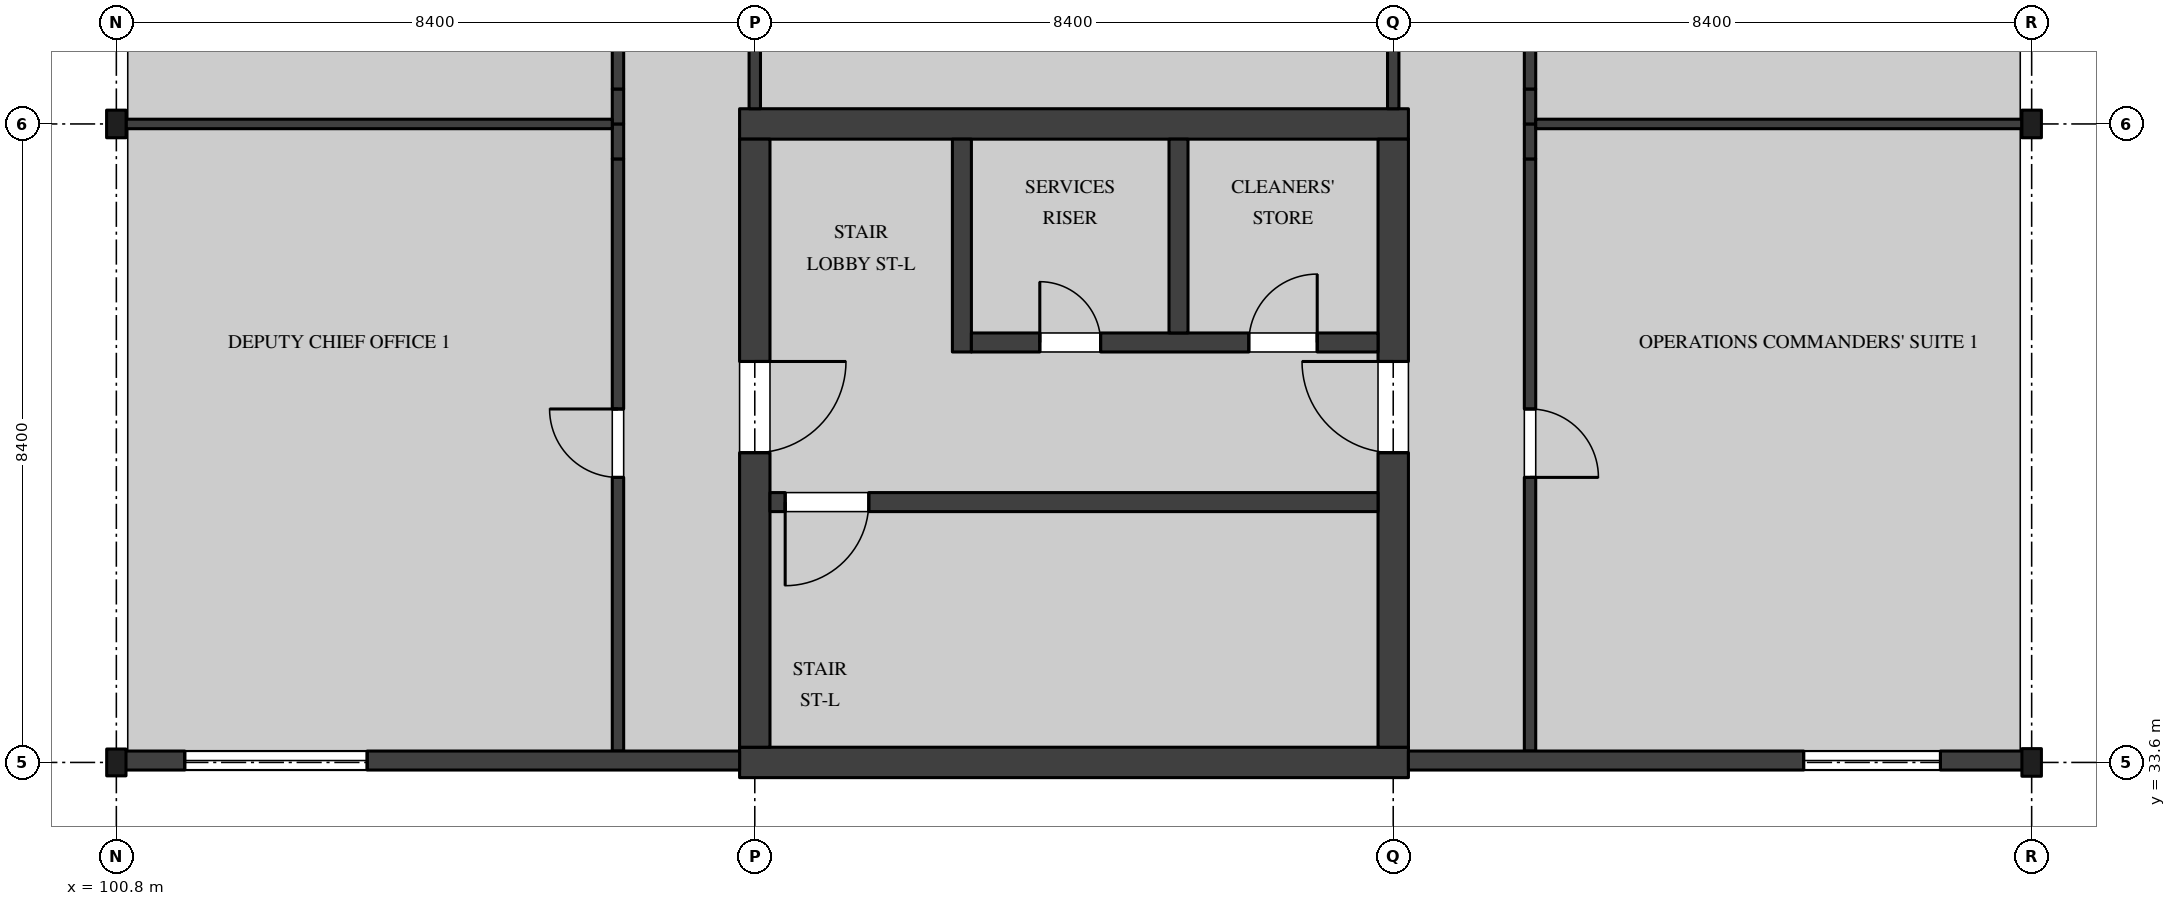
"""IFC4 building model, lengths in metres.
Left out: names, types, materials, properties, quantities, classifications, styles, units other than length and angle.
Written with IfcOpenShell. Run it as: python <this file> out.ifc"""

import sys

from ifc_helpers import new_model, si_unit, direction, frame, frame_2d, origin, origin_2d, place, context, subcontext, project, spatial, rectangle, i_section, extrude, element, fill, save


model = new_model("IFC4")
c1 = context("Model", 3, precision=1e-05, world=origin(), true_north=direction((0.0, 1.0)))
c2 = subcontext(c1, "Body", "Model", "MODEL_VIEW")
j1 = project(units=[si_unit("LENGTHUNIT", "METRE"), si_unit("PLANEANGLEUNIT", "RADIAN")], contexts=[c1])
p1 = place(None, origin())
s1 = spatial("IfcSite", under=j1, at=p1, CompositionType="ELEMENT")
p2 = place(p1, origin())
s2 = spatial("IfcBuilding", under=s1, at=p2, CompositionType="ELEMENT")
p3 = place(p2, frame((0.0, 0.0, 36.9)))
s3 = spatial("IfcBuildingStorey", under=s2, at=p3, CompositionType="ELEMENT", Elevation=36.9)
p4 = place(p3, frame((100.8, 33.6, 0.0), z_axis=(0.0, 0.0, 1.0), x_axis=(1.0, 0.0, 0.0)))
e1 = element("IfcColumn", 1, at=p4, inside=s3, PredefinedType="COLUMN", context=c2, shape_type="SweptSolid", body=[
    extrude(i_section(OverallWidth=0.254, OverallDepth=0.353, WebThickness=0.01, FlangeThickness=0.016, FilletRadius=0.015, at=origin_2d()), origin(), (0.0, 0.0, 1.0), 4.37),
])
for number, where, z_axis, x_axis in (
    (2, (100.8, 42.0, 0.0), (0.0, 0.0, 1.0), (1.0, 0.0, 0.0)),
    (3, (126.0, 33.6, 0.0), (0.0, 0.0, 1.0), (1.0, 0.0, 0.0)),
    (4, (126.0, 42.0, 0.0), (0.0, 0.0, 1.0), (1.0, 0.0, 0.0)),
):
    element("IfcColumn", number, at=place(p3, frame(where, z_axis=z_axis, x_axis=x_axis)), inside=s3, PredefinedType="COLUMN", context=c2, shape_type="SweptSolid", body=[
        extrude(i_section(OverallWidth=0.257, OverallDepth=0.363, WebThickness=0.013, FlangeThickness=0.022, FilletRadius=0.015, at=origin_2d()), origin(), (0.0, 0.0, 1.0), 4.37),
    ])
for number, where, z_axis, x_axis in (
    (5, (109.0, 33.6, 0.0), (0.0, 0.0, 1.0), (1.0, 0.0, 0.0)),
    (6, (109.0, 42.0, 0.0), (0.0, 0.0, 1.0), (1.0, 0.0, 0.0)),
):
    element("IfcWall", number, at=place(p3, frame(where, z_axis=z_axis, x_axis=x_axis)), inside=s3, PredefinedType="SHEAR", context=c2, shape_type="SweptSolid", body=[
        extrude(rectangle(XDim=8.8, YDim=0.4, at=frame_2d((4.4, 0.0))), origin(), (0.0, 0.0, 1.0), 4.37),
    ])
p5 = place(p3, frame((109.2, 33.8, 0.0), z_axis=(0.0, 0.0, 1.0), x_axis=(0.0, 1.0, 0.0)))
e7 = element("IfcWall", 7, at=p5, inside=s3, PredefinedType="SHEAR", context=c2, shape_type="SweptSolid", body=[
    extrude(rectangle(XDim=8.0, YDim=0.4, at=frame_2d((4.0, 0.0))), origin(), (0.0, 0.0, 1.0), 4.37),
])
p6 = place(p5, frame((3.875, 0.0, 0.0)))
e8 = element("IfcOpeningElement", 8, at=p6, cuts=e7, PredefinedType="OPENING", context=c2, shape_type="SweptSolid", body=[
    extrude(rectangle(XDim=1.2, YDim=2.1, at=frame_2d((0.6, 1.05))), frame((0.0, 0.21, 0.0), z_axis=(0.0, -1.0, 0.0), x_axis=(1.0, 0.0, 0.0)), (0.0, 0.0, 1.0), 0.42),
])
p7 = place(p3, frame((117.6, 33.8, 0.0), z_axis=(0.0, 0.0, 1.0), x_axis=(0.0, 1.0, 0.0)))
e9 = element("IfcWall", 9, at=p7, inside=s3, PredefinedType="SHEAR", context=c2, shape_type="SweptSolid", body=[
    extrude(rectangle(XDim=8.0, YDim=0.4, at=frame_2d((4.0, 0.0))), origin(), (0.0, 0.0, 1.0), 4.37),
])
p8 = place(p7, frame((3.875, 0.0, 0.0)))
e10 = element("IfcOpeningElement", 10, at=p8, cuts=e9, PredefinedType="OPENING", context=c2, shape_type="SweptSolid", body=[
    extrude(rectangle(XDim=1.2, YDim=2.1, at=frame_2d((0.6, 1.05))), frame((0.0, 0.21, 0.0), z_axis=(0.0, -1.0, 0.0), x_axis=(1.0, 0.0, 0.0)), (0.0, 0.0, 1.0), 0.42),
])
p9 = place(p3, frame((109.4, 37.025, 0.0), z_axis=(0.0, 0.0, 1.0), x_axis=(1.0, 0.0, 0.0)))
e11 = element("IfcWall", 11, at=p9, inside=s3, PredefinedType="SOLIDWALL", context=c2, shape_type="SweptSolid", body=[
    extrude(rectangle(XDim=8.0, YDim=0.25, at=frame_2d((4.0, 0.0))), origin(), (0.0, 0.0, 1.0), 4.37),
])
p10 = place(p9, frame((0.2, 0.0, 0.0)))
e12 = element("IfcOpeningElement", 12, at=p10, cuts=e11, PredefinedType="OPENING", context=c2, shape_type="SweptSolid", body=[
    extrude(rectangle(XDim=1.1, YDim=2.1, at=frame_2d((0.55, 1.05))), frame((0.0, 0.135, 0.0), z_axis=(0.0, -1.0, 0.0), x_axis=(1.0, 0.0, 0.0)), (0.0, 0.0, 1.0), 0.27),
])
p11 = place(p3, frame((111.925, 39.0, 0.0), z_axis=(0.0, 0.0, 1.0), x_axis=(0.0, 1.0, 0.0)))
e13 = element("IfcWall", 13, at=p11, inside=s3, PredefinedType="SOLIDWALL", context=c2, shape_type="SweptSolid", body=[
    extrude(rectangle(XDim=2.8, YDim=0.25, at=frame_2d((1.4, 0.0))), origin(), (0.0, 0.0, 1.0), 4.37),
])
p12 = place(p3, frame((112.05, 39.125, 0.0), z_axis=(0.0, 0.0, 1.0), x_axis=(1.0, 0.0, 0.0)))
e14 = element("IfcWall", 14, at=p12, inside=s3, PredefinedType="SOLIDWALL", context=c2, shape_type="SweptSolid", body=[
    extrude(rectangle(XDim=5.35, YDim=0.25, at=frame_2d((2.675, 0.0))), origin(), (0.0, 0.0, 1.0), 4.37),
])
p13 = place(p12, frame((3.65, 0.0, 0.0)))
e15 = element("IfcOpeningElement", 15, at=p13, cuts=e14, PredefinedType="OPENING", context=c2, shape_type="SweptSolid", body=[
    extrude(rectangle(XDim=0.9, YDim=2.1, at=frame_2d((0.45, 1.05))), frame((0.0, 0.135, 0.0), z_axis=(0.0, -1.0, 0.0), x_axis=(1.0, 0.0, 0.0)), (0.0, 0.0, 1.0), 0.27),
])
p14 = place(p12, frame((0.9, 0.0, 0.0)))
e16 = element("IfcOpeningElement", 16, at=p14, cuts=e14, PredefinedType="OPENING", context=c2, shape_type="SweptSolid", body=[
    extrude(rectangle(XDim=0.8, YDim=2.1, at=frame_2d((0.4, 1.05))), frame((0.0, 0.135, 0.0), z_axis=(0.0, -1.0, 0.0), x_axis=(1.0, 0.0, 0.0)), (0.0, 0.0, 1.0), 0.27),
])
p15 = place(p3, frame((114.775, 39.25, 0.0), z_axis=(0.0, 0.0, 1.0), x_axis=(0.0, 1.0, 0.0)))
e17 = element("IfcWall", 17, at=p15, inside=s3, PredefinedType="SOLIDWALL", context=c2, shape_type="SweptSolid", body=[
    extrude(rectangle(XDim=2.55, YDim=0.25, at=frame_2d((1.275, 0.0))), origin(), (0.0, 0.0, 1.0), 4.37),
])
p16 = place(p3, frame((119.4, 33.75, 0.0), z_axis=(0.0, 0.0, 1.0), x_axis=(0.0, 1.0, 0.0)))
e18 = element("IfcWall", 18, at=p16, inside=s3, PredefinedType="PARTITIONING", context=c2, shape_type="SweptSolid", body=[
    extrude(rectangle(XDim=7.79, YDim=0.15, at=frame_2d((3.895, 0.0))), origin(), (0.0, 0.0, 1.0), 4.37),
])
p17 = place(p16, frame((3.6, 0.0, 0.0)))
e19 = element("IfcOpeningElement", 19, at=p17, cuts=e18, PredefinedType="OPENING", context=c2, shape_type="SweptSolid", body=[
    extrude(rectangle(XDim=0.9, YDim=2.1, at=frame_2d((0.45, 1.05))), frame((0.0, 0.085, 0.0), z_axis=(0.0, -1.0, 0.0), x_axis=(1.0, 0.0, 0.0)), (0.0, 0.0, 1.0), 0.17),
])
for number, where, z_axis, x_axis in (
    (20, (119.4, 41.54, 0.0), (0.0, 0.0, 1.0), (0.0, 1.0, 0.0)),
    (21, (119.4, 42.0, 0.0), (0.0, 0.0, 1.0), (0.0, 1.0, 0.0)),
):
    element("IfcWall", number, at=place(p3, frame(where, z_axis=z_axis, x_axis=x_axis)), inside=s3, PredefinedType="PARTITIONING", context=c2, shape_type="SweptSolid", body=[
        extrude(rectangle(XDim=0.46, YDim=0.15, at=frame_2d((0.23, 0.0))), origin(), (0.0, 0.0, 1.0), 3.817),
    ])
p18 = place(p3, frame((119.4, 42.46, 0.0), z_axis=(0.0, 0.0, 1.0), x_axis=(0.0, 1.0, 0.0)))
e22 = element("IfcWall", 22, at=p18, inside=s3, PredefinedType="PARTITIONING", context=c2, shape_type="SweptSolid", body=[
    extrude(rectangle(XDim=7.48, YDim=0.15, at=frame_2d((3.74, 0.0))), origin(), (0.0, 0.0, 1.0), 4.37),
])
p19 = place(p18, frame((3.29, 0.0, 0.0)))
e23 = element("IfcOpeningElement", 23, at=p19, cuts=e22, PredefinedType="OPENING", context=c2, shape_type="SweptSolid", body=[
    extrude(rectangle(XDim=0.9, YDim=2.1, at=frame_2d((0.45, 1.05))), frame((0.0, 0.085, 0.0), z_axis=(0.0, -1.0, 0.0), x_axis=(1.0, 0.0, 0.0)), (0.0, 0.0, 1.0), 0.17),
])
p20 = place(p3, frame((117.6, 42.2, 0.0), z_axis=(0.0, 0.0, 1.0), x_axis=(0.0, 1.0, 0.0)))
e24 = element("IfcWall", 24, at=p20, inside=s3, PredefinedType="PARTITIONING", context=c2, shape_type="SweptSolid", body=[
    extrude(rectangle(XDim=8.0, YDim=0.15, at=frame_2d((4.0, 0.0))), origin(), (0.0, 0.0, 1.0), 3.817),
])
p21 = place(p20, frame((2.35, 0.0, 0.0)))
e25 = element("IfcOpeningElement", 25, at=p21, cuts=e24, PredefinedType="OPENING", context=c2, shape_type="SweptSolid", body=[
    extrude(rectangle(XDim=1.2, YDim=2.4, at=frame_2d((0.6, 1.2))), frame((0.0, 0.085, 0.0), z_axis=(0.0, -1.0, 0.0), x_axis=(1.0, 0.0, 0.0)), (0.0, 0.0, 1.0), 0.17),
])
p22 = place(p3, frame((109.2, 42.2, 0.0), z_axis=(0.0, 0.0, 1.0), x_axis=(0.0, 1.0, 0.0)))
e26 = element("IfcWall", 26, at=p22, inside=s3, PredefinedType="PARTITIONING", context=c2, shape_type="SweptSolid", body=[
    extrude(rectangle(XDim=8.0, YDim=0.15, at=frame_2d((4.0, 0.0))), origin(), (0.0, 0.0, 1.0), 3.817),
])
p23 = place(p22, frame((3.4, 0.0, 0.0)))
e27 = element("IfcOpeningElement", 27, at=p23, cuts=e26, PredefinedType="OPENING", context=c2, shape_type="SweptSolid", body=[
    extrude(rectangle(XDim=1.2, YDim=2.4, at=frame_2d((0.6, 1.2))), frame((0.0, 0.085, 0.0), z_axis=(0.0, -1.0, 0.0), x_axis=(1.0, 0.0, 0.0)), (0.0, 0.0, 1.0), 0.17),
])
p24 = place(p3, frame((107.4, 33.75, 0.0), z_axis=(0.0, 0.0, 1.0), x_axis=(0.0, 1.0, 0.0)))
e28 = element("IfcWall", 28, at=p24, inside=s3, PredefinedType="PARTITIONING", context=c2, shape_type="SweptSolid", body=[
    extrude(rectangle(XDim=7.79, YDim=0.15, at=frame_2d((3.895, 0.0))), origin(), (0.0, 0.0, 1.0), 4.37),
])
p25 = place(p24, frame((3.6, 0.0, 0.0)))
e29 = element("IfcOpeningElement", 29, at=p25, cuts=e28, PredefinedType="OPENING", context=c2, shape_type="SweptSolid", body=[
    extrude(rectangle(XDim=0.9, YDim=2.1, at=frame_2d((0.45, 1.05))), frame((0.0, 0.085, 0.0), z_axis=(0.0, -1.0, 0.0), x_axis=(1.0, 0.0, 0.0)), (0.0, 0.0, 1.0), 0.17),
])
for number, where, z_axis, x_axis in (
    (30, (107.4, 41.54, 0.0), (0.0, 0.0, 1.0), (0.0, 1.0, 0.0)),
    (31, (107.4, 42.0, 0.0), (0.0, 0.0, 1.0), (0.0, 1.0, 0.0)),
):
    element("IfcWall", number, at=place(p3, frame(where, z_axis=z_axis, x_axis=x_axis)), inside=s3, PredefinedType="PARTITIONING", context=c2, shape_type="SweptSolid", body=[
        extrude(rectangle(XDim=0.46, YDim=0.15, at=frame_2d((0.23, 0.0))), origin(), (0.0, 0.0, 1.0), 3.817),
    ])
p26 = place(p3, frame((107.4, 42.46, 0.0), z_axis=(0.0, 0.0, 1.0), x_axis=(0.0, 1.0, 0.0)))
e32 = element("IfcWall", 32, at=p26, inside=s3, PredefinedType="PARTITIONING", context=c2, shape_type="SweptSolid", body=[
    extrude(rectangle(XDim=7.48, YDim=0.15, at=frame_2d((3.74, 0.0))), origin(), (0.0, 0.0, 1.0), 4.37),
])
p27 = place(p26, frame((2.24, 0.0, 0.0)))
e33 = element("IfcOpeningElement", 33, at=p27, cuts=e32, PredefinedType="OPENING", context=c2, shape_type="SweptSolid", body=[
    extrude(rectangle(XDim=0.9, YDim=2.1, at=frame_2d((0.45, 1.05))), frame((0.0, 0.085, 0.0), z_axis=(0.0, -1.0, 0.0), x_axis=(1.0, 0.0, 0.0)), (0.0, 0.0, 1.0), 0.17),
])
p28 = place(p3, frame((119.475, 42.0, 0.0), z_axis=(0.0, 0.0, 1.0), x_axis=(1.0, 0.0, 0.0)))
e34 = element("IfcWall", 34, at=p28, inside=s3, PredefinedType="PARTITIONING", context=c2, shape_type="SweptSolid", body=[
    extrude(rectangle(XDim=6.396, YDim=0.125, at=frame_2d((3.198, 0.0))), origin(), (0.0, 0.0, 1.0), 3.817),
])
p29 = place(p3, frame((100.928, 42.0, 0.0), z_axis=(0.0, 0.0, 1.0), x_axis=(1.0, 0.0, 0.0)))
e35 = element("IfcWall", 35, at=p29, inside=s3, PredefinedType="PARTITIONING", context=c2, shape_type="SweptSolid", body=[
    extrude(rectangle(XDim=6.397, YDim=0.125, at=frame_2d((3.198, 0.0))), origin(), (0.0, 0.0, 1.0), 3.817),
])
p30 = place(p3, frame((100.805, 33.625, 0.0), z_axis=(0.0, 0.0, 1.0), x_axis=(1.0, 0.0, 0.0)))
e36 = element("IfcWall", 36, at=p30, inside=s3, PredefinedType="SOLIDWALL", context=c2, shape_type="SweptSolid", body=[
    extrude(rectangle(XDim=8.195, YDim=0.25, at=frame_2d((4.097, 0.0))), origin(), (0.0, 0.0, 1.0), 3.819),
])
p31 = place(p30, frame((0.895, 0.0, 0.6)))
e37 = element("IfcOpeningElement", 37, at=p31, cuts=e36, PredefinedType="OPENING", context=c2, shape_type="SweptSolid", body=[
    extrude(rectangle(XDim=2.4, YDim=2.4, at=frame_2d((1.2, 1.2))), frame((0.0, 0.135, 0.0), z_axis=(0.0, -1.0, 0.0), x_axis=(1.0, 0.0, 0.0)), (0.0, 0.0, 1.0), 0.27),
])
p32 = place(p3, frame((117.8, 33.625, 0.0), z_axis=(0.0, 0.0, 1.0), x_axis=(1.0, 0.0, 0.0)))
e38 = element("IfcWall", 38, at=p32, inside=s3, PredefinedType="SOLIDWALL", context=c2, shape_type="SweptSolid", body=[
    extrude(rectangle(XDim=8.196, YDim=0.25, at=frame_2d((4.098, 0.0))), origin(), (0.0, 0.0, 1.0), 3.819),
])
p33 = place(p32, frame((5.2, 0.0, 0.6)))
e39 = element("IfcOpeningElement", 39, at=p33, cuts=e38, PredefinedType="OPENING", context=c2, shape_type="SweptSolid", body=[
    extrude(rectangle(XDim=1.8, YDim=2.4, at=frame_2d((0.9, 1.2))), frame((0.0, 0.135, 0.0), z_axis=(0.0, -1.0, 0.0), x_axis=(1.0, 0.0, 0.0)), (0.0, 0.0, 1.0), 0.27),
])
p34 = place(p13, origin())
e40 = element("IfcDoor", 40, at=p34, inside=s3, OperationType="SINGLE_SWING_LEFT", PredefinedType="DOOR", context=c2, shape_type="SweptSolid", body=[
    extrude(rectangle(XDim=0.9, YDim=2.1, at=frame_2d((0.45, 1.05))), frame((0.0, 0.035, 0.0), z_axis=(0.0, -1.0, 0.0), x_axis=(1.0, 0.0, 0.0)), (0.0, 0.0, 1.0), 0.07),
])
fill(e15, e40)
p35 = place(p6, frame((1.2, 0.0, 0.0), z_axis=(0.0, 0.0, 1.0), x_axis=(-1.0, 0.0, 0.0)))
e41 = element("IfcDoor", 41, at=p35, inside=s3, OperationType="SINGLE_SWING_RIGHT", PredefinedType="DOOR", context=c2, shape_type="SweptSolid", body=[
    extrude(rectangle(XDim=1.2, YDim=2.1, at=frame_2d((0.6, 1.05))), frame((0.0, 0.035, 0.0), z_axis=(0.0, -1.0, 0.0), x_axis=(1.0, 0.0, 0.0)), (0.0, 0.0, 1.0), 0.07),
])
fill(e8, e41)
p36 = place(p8, origin())
e42 = element("IfcDoor", 42, at=p36, inside=s3, OperationType="SINGLE_SWING_LEFT", PredefinedType="DOOR", context=c2, shape_type="SweptSolid", body=[
    extrude(rectangle(XDim=1.2, YDim=2.1, at=frame_2d((0.6, 1.05))), frame((0.0, 0.035, 0.0), z_axis=(0.0, -1.0, 0.0), x_axis=(1.0, 0.0, 0.0)), (0.0, 0.0, 1.0), 0.07),
])
fill(e10, e42)
p37 = place(p14, origin())
e43 = element("IfcDoor", 43, at=p37, inside=s3, OperationType="SINGLE_SWING_RIGHT", PredefinedType="DOOR", context=c2, shape_type="SweptSolid", body=[
    extrude(rectangle(XDim=0.8, YDim=2.1, at=frame_2d((0.4, 1.05))), frame((0.0, 0.035, 0.0), z_axis=(0.0, -1.0, 0.0), x_axis=(1.0, 0.0, 0.0)), (0.0, 0.0, 1.0), 0.07),
])
fill(e16, e43)
p38 = place(p10, frame((1.1, 0.0, 0.0), z_axis=(0.0, 0.0, 1.0), x_axis=(-1.0, 0.0, 0.0)))
e44 = element("IfcDoor", 44, at=p38, inside=s3, OperationType="SINGLE_SWING_LEFT", PredefinedType="DOOR", context=c2, shape_type="SweptSolid", body=[
    extrude(rectangle(XDim=1.1, YDim=2.1, at=frame_2d((0.55, 1.05))), frame((0.0, 0.035, 0.0), z_axis=(0.0, -1.0, 0.0), x_axis=(1.0, 0.0, 0.0)), (0.0, 0.0, 1.0), 0.07),
])
fill(e12, e44)
p39 = place(p17, frame((0.9, 0.0, 0.0), z_axis=(0.0, 0.0, 1.0), x_axis=(-1.0, 0.0, 0.0)))
e45 = element("IfcDoor", 45, at=p39, inside=s3, OperationType="SINGLE_SWING_LEFT", PredefinedType="DOOR", context=c2, shape_type="SweptSolid", body=[
    extrude(rectangle(XDim=0.9, YDim=2.1, at=frame_2d((0.45, 1.05))), frame((0.0, 0.025, 0.0), z_axis=(0.0, -1.0, 0.0), x_axis=(1.0, 0.0, 0.0)), (0.0, 0.0, 1.0), 0.05),
])
fill(e19, e45)
p40 = place(p25, origin())
e46 = element("IfcDoor", 46, at=p40, inside=s3, OperationType="SINGLE_SWING_LEFT", PredefinedType="DOOR", context=c2, shape_type="SweptSolid", body=[
    extrude(rectangle(XDim=0.9, YDim=2.1, at=frame_2d((0.45, 1.05))), frame((0.0, 0.025, 0.0), z_axis=(0.0, -1.0, 0.0), x_axis=(1.0, 0.0, 0.0)), (0.0, 0.0, 1.0), 0.05),
])
fill(e29, e46)
p41 = place(p31, origin())
e47 = element("IfcWindow", 47, at=p41, inside=s3, PartitioningType="SINGLE_PANEL", PredefinedType="WINDOW", context=c2, shape_type="SweptSolid", body=[
    extrude(rectangle(XDim=2.4, YDim=2.4, at=frame_2d((1.2, 1.2))), frame((0.0, 0.04, 0.0), z_axis=(0.0, -1.0, 0.0), x_axis=(1.0, 0.0, 0.0)), (0.0, 0.0, 1.0), 0.08),
])
fill(e37, e47)
p42 = place(p33, origin())
e48 = element("IfcWindow", 48, at=p42, inside=s3, PartitioningType="SINGLE_PANEL", PredefinedType="WINDOW", context=c2, shape_type="SweptSolid", body=[
    extrude(rectangle(XDim=1.8, YDim=2.4, at=frame_2d((0.9, 1.2))), frame((0.0, 0.04, 0.0), z_axis=(0.0, -1.0, 0.0), x_axis=(1.0, 0.0, 0.0)), (0.0, 0.0, 1.0), 0.08),
])
fill(e39, e48)
save(model, sys.argv[1])
